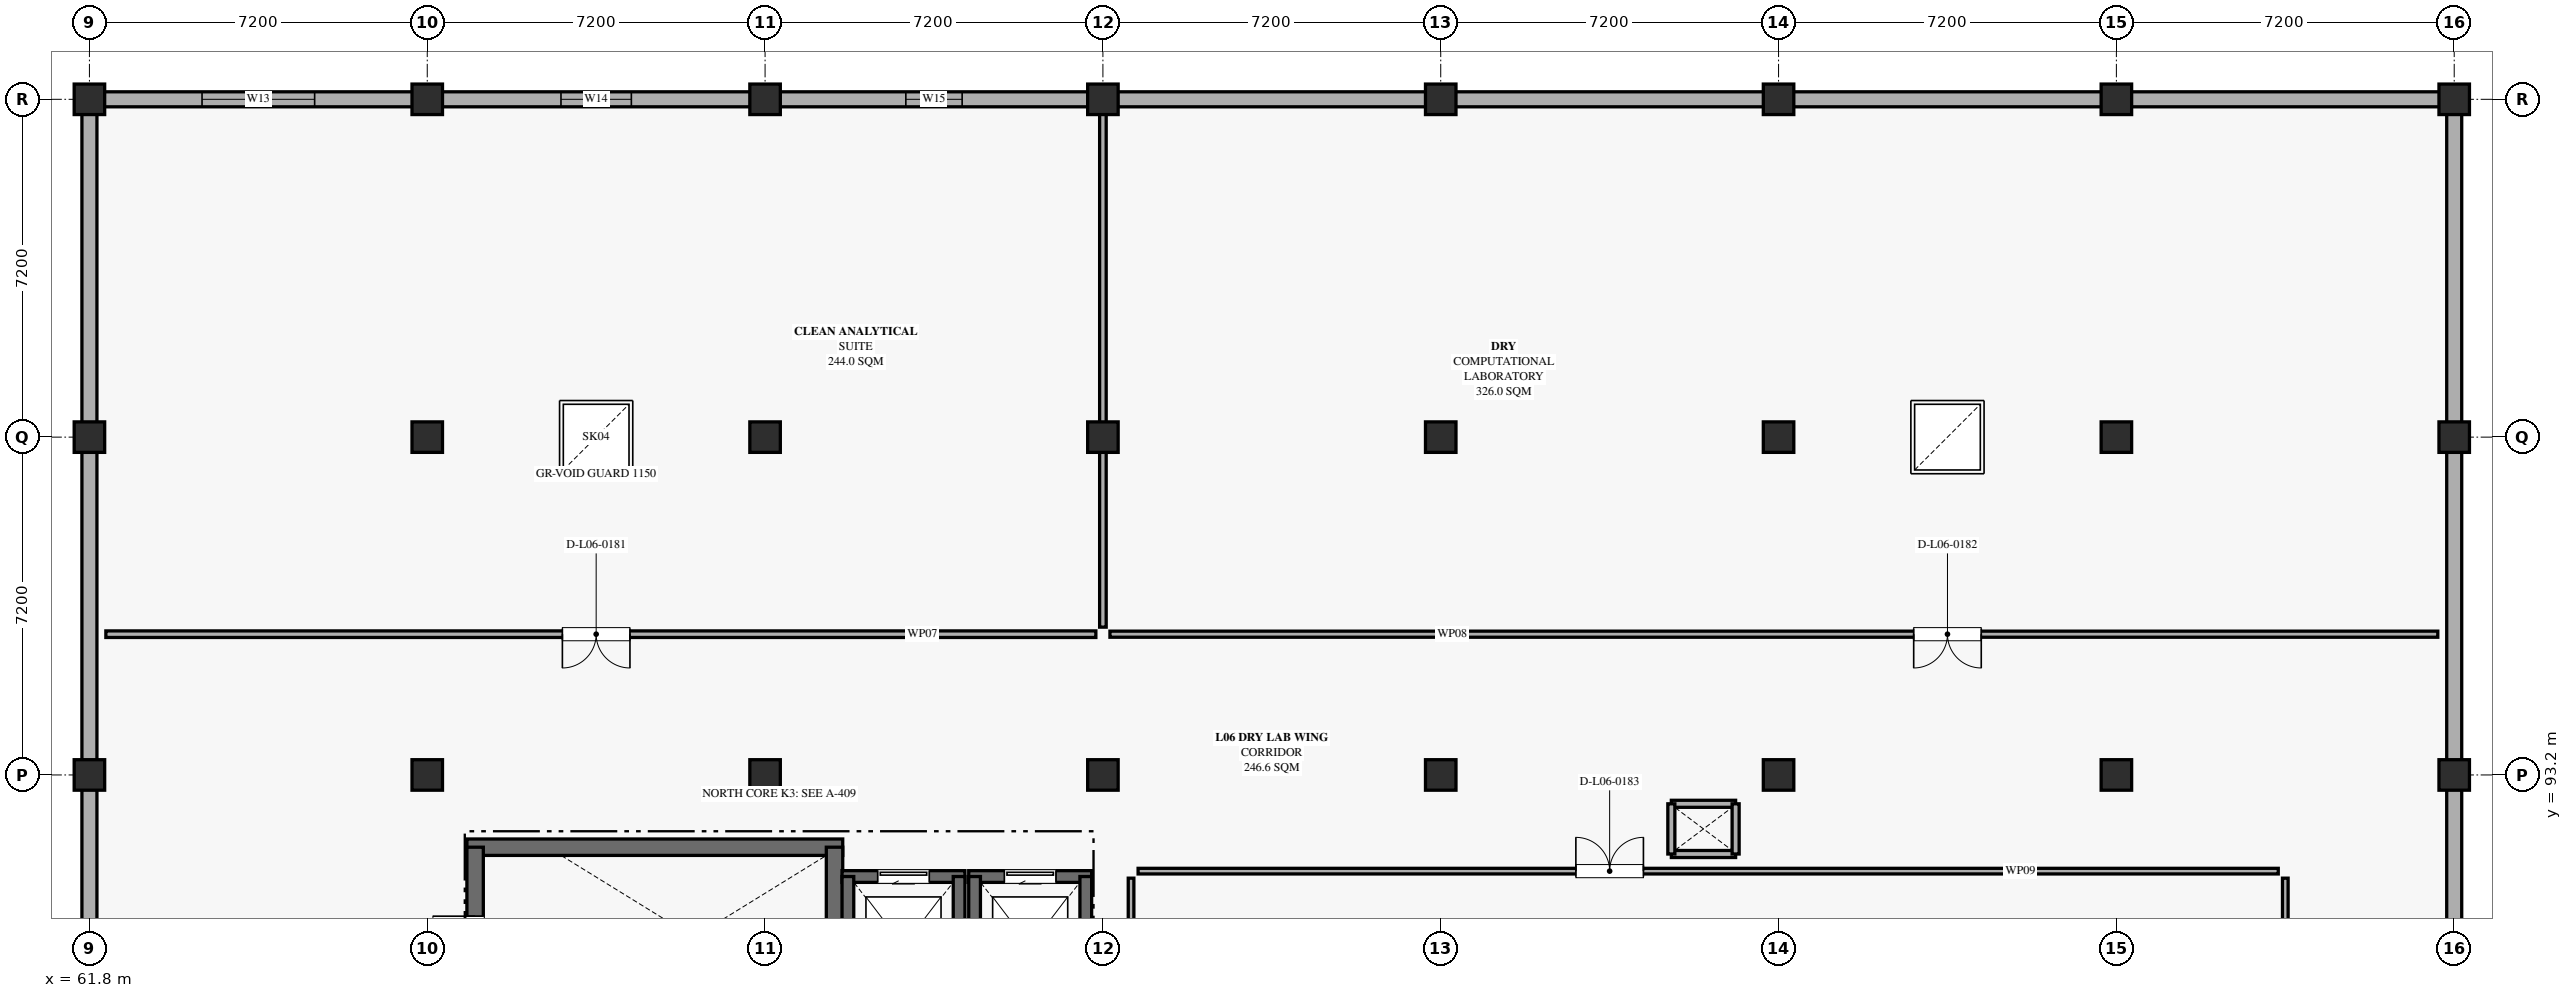
"""IFC4 building model, lengths in metres.
Left out: names, types, materials, properties, quantities, classifications, styles, units other than length and angle.
Written with IfcOpenShell. Run it as: python <this file> out.ifc"""

import sys

from ifc_helpers import new_model, si_unit, direction, frame, frame_2d, origin, origin_2d, place, context, subcontext, project, spatial, rectangle, extrude, element, fill, save


model = new_model("IFC4")
c1 = context("Model", 3, precision=1e-05, world=origin(), true_north=direction((0.0, 1.0)))
c2 = subcontext(c1, "Body", "Model", "MODEL_VIEW")
j1 = project(units=[si_unit("LENGTHUNIT", "METRE"), si_unit("PLANEANGLEUNIT", "RADIAN")], contexts=[c1])
p1 = place(None, origin())
s1 = spatial("IfcSite", under=j1, at=p1, CompositionType="ELEMENT")
p2 = place(p1, origin())
s2 = spatial("IfcBuilding", under=s1, at=p2, CompositionType="ELEMENT")
p3 = place(p2, frame((0.0, 0.0, 28.8)))
s3 = spatial("IfcBuildingStorey", under=s2, at=p3, CompositionType="ELEMENT", Elevation=28.8)
for number, where, z_axis, x_axis in (
    (1, (61.8, 93.2, 0.0), (0.0, 0.0, 1.0), (1.0, 0.0, 0.0)),
    (2, (69.0, 93.2, 0.0), (0.0, 0.0, 1.0), (1.0, 0.0, 0.0)),
    (3, (76.2, 93.2, 0.0), (0.0, 0.0, 1.0), (1.0, 0.0, 0.0)),
    (4, (83.4, 93.2, 0.0), (0.0, 0.0, 1.0), (1.0, 0.0, 0.0)),
    (5, (90.6, 93.2, 0.0), (0.0, 0.0, 1.0), (1.0, 0.0, 0.0)),
    (6, (97.8, 93.2, 0.0), (0.0, 0.0, 1.0), (1.0, 0.0, 0.0)),
    (7, (105.0, 93.2, 0.0), (0.0, 0.0, 1.0), (1.0, 0.0, 0.0)),
    (8, (112.2, 93.2, 0.0), (0.0, 0.0, 1.0), (1.0, 0.0, 0.0)),
    (9, (61.8, 100.4, 0.0), (0.0, 0.0, 1.0), (1.0, 0.0, 0.0)),
    (10, (69.0, 100.4, 0.0), (0.0, 0.0, 1.0), (1.0, 0.0, 0.0)),
    (11, (76.2, 100.4, 0.0), (0.0, 0.0, 1.0), (1.0, 0.0, 0.0)),
    (12, (83.4, 100.4, 0.0), (0.0, 0.0, 1.0), (1.0, 0.0, 0.0)),
    (13, (90.6, 100.4, 0.0), (0.0, 0.0, 1.0), (1.0, 0.0, 0.0)),
    (14, (97.8, 100.4, 0.0), (0.0, 0.0, 1.0), (1.0, 0.0, 0.0)),
    (15, (105.0, 100.4, 0.0), (0.0, 0.0, 1.0), (1.0, 0.0, 0.0)),
    (16, (112.2, 100.4, 0.0), (0.0, 0.0, 1.0), (1.0, 0.0, 0.0)),
    (17, (61.8, 107.6, 0.0), (0.0, 0.0, 1.0), (1.0, 0.0, 0.0)),
    (18, (69.0, 107.6, 0.0), (0.0, 0.0, 1.0), (1.0, 0.0, 0.0)),
    (19, (76.2, 107.6, 0.0), (0.0, 0.0, 1.0), (1.0, 0.0, 0.0)),
    (20, (83.4, 107.6, 0.0), (0.0, 0.0, 1.0), (1.0, 0.0, 0.0)),
    (21, (90.6, 107.6, 0.0), (0.0, 0.0, 1.0), (1.0, 0.0, 0.0)),
    (22, (97.8, 107.6, 0.0), (0.0, 0.0, 1.0), (1.0, 0.0, 0.0)),
    (23, (105.0, 107.6, 0.0), (0.0, 0.0, 1.0), (1.0, 0.0, 0.0)),
    (24, (112.2, 107.6, 0.0), (0.0, 0.0, 1.0), (1.0, 0.0, 0.0)),
):
    element("IfcColumn", number, at=place(p3, frame(where, z_axis=z_axis, x_axis=x_axis)), inside=s3, PredefinedType="COLUMN", context=c2, shape_type="SweptSolid", body=[
        extrude(rectangle(XDim=0.65, YDim=0.65, at=origin_2d()), origin(), (0.0, 0.0, 1.0), 4.5),
    ])
for number, where, z_axis, x_axis in (
    (25, (61.8, 86.31, 0.0), (0.0, 0.0, 1.0), (0.0, 1.0, 0.0)),
    (26, (112.2, 92.89, 0.0), (0.0, 0.0, 1.0), (0.0, -1.0, 0.0)),
):
    element("IfcWall", number, at=place(p3, frame(where, z_axis=z_axis, x_axis=x_axis)), inside=s3, PredefinedType="SOLIDWALL", context=c2, shape_type="SweptSolid", body=[
        extrude(rectangle(XDim=6.58, YDim=0.32, at=frame_2d((3.29, 0.0))), origin(), (0.0, 0.0, 1.0), 3.0),
    ])
for number, where, z_axis, x_axis in (
    (27, (61.8, 93.51, 0.0), (0.0, 0.0, 1.0), (0.0, 1.0, 0.0)),
    (28, (112.2, 100.09, 0.0), (0.0, 0.0, 1.0), (0.0, -1.0, 0.0)),
    (29, (61.8, 100.71, 0.0), (0.0, 0.0, 1.0), (0.0, 1.0, 0.0)),
    (30, (112.2, 107.29, 0.0), (0.0, 0.0, 1.0), (0.0, -1.0, 0.0)),
):
    element("IfcWall", number, at=place(p3, frame(where, z_axis=z_axis, x_axis=x_axis)), inside=s3, PredefinedType="SOLIDWALL", context=c2, shape_type="SweptSolid", body=[
        extrude(rectangle(XDim=6.58, YDim=0.32, at=frame_2d((3.29, 0.0))), origin(), (0.0, 0.0, 1.0), 3.0),
    ])
p4 = place(p3, frame((62.11, 107.6, 0.0), z_axis=(0.0, 0.0, 1.0), x_axis=(1.0, 0.0, 0.0)))
e31 = element("IfcWall", 31, at=p4, inside=s3, PredefinedType="SOLIDWALL", context=c2, shape_type="SweptSolid", body=[
    extrude(rectangle(XDim=6.58, YDim=0.32, at=frame_2d((3.29, 0.0))), origin(), (0.0, 0.0, 1.0), 3.0),
])
p5 = place(p4, frame((2.09, 0.0, 0.85)))
e32 = element("IfcOpeningElement", 32, at=p5, cuts=e31, PredefinedType="OPENING", context=c2, shape_type="SweptSolid", body=[
    extrude(rectangle(XDim=2.4, YDim=1.8, at=frame_2d((1.2, 0.9))), frame((0.0, 0.17, 0.0), z_axis=(0.0, -1.0, 0.0), x_axis=(1.0, 0.0, 0.0)), (0.0, 0.0, 1.0), 0.34),
])
p6 = place(p3, frame((69.31, 107.6, 0.0), z_axis=(0.0, 0.0, 1.0), x_axis=(1.0, 0.0, 0.0)))
e33 = element("IfcWall", 33, at=p6, inside=s3, PredefinedType="SOLIDWALL", context=c2, shape_type="SweptSolid", body=[
    extrude(rectangle(XDim=6.58, YDim=0.32, at=frame_2d((3.29, 0.0))), origin(), (0.0, 0.0, 1.0), 3.0),
])
p7 = place(p6, frame((2.54, 0.0, 0.85)))
e34 = element("IfcOpeningElement", 34, at=p7, cuts=e33, PredefinedType="OPENING", context=c2, shape_type="SweptSolid", body=[
    extrude(rectangle(XDim=1.5, YDim=1.8, at=frame_2d((0.75, 0.9))), frame((0.0, 0.17, 0.0), z_axis=(0.0, -1.0, 0.0), x_axis=(1.0, 0.0, 0.0)), (0.0, 0.0, 1.0), 0.34),
])
p8 = place(p3, frame((76.51, 107.6, 0.0), z_axis=(0.0, 0.0, 1.0), x_axis=(1.0, 0.0, 0.0)))
e35 = element("IfcWall", 35, at=p8, inside=s3, PredefinedType="SOLIDWALL", context=c2, shape_type="SweptSolid", body=[
    extrude(rectangle(XDim=6.58, YDim=0.32, at=frame_2d((3.29, 0.0))), origin(), (0.0, 0.0, 1.0), 3.0),
])
p9 = place(p8, frame((2.69, 0.0, 0.85)))
e36 = element("IfcOpeningElement", 36, at=p9, cuts=e35, PredefinedType="OPENING", context=c2, shape_type="SweptSolid", body=[
    extrude(rectangle(XDim=1.2, YDim=1.8, at=frame_2d((0.6, 0.9))), frame((0.0, 0.17, 0.0), z_axis=(0.0, -1.0, 0.0), x_axis=(1.0, 0.0, 0.0)), (0.0, 0.0, 1.0), 0.34),
])
for number, where, z_axis, x_axis in (
    (37, (83.71, 107.6, 0.0), (0.0, 0.0, 1.0), (1.0, 0.0, 0.0)),
    (38, (90.91, 107.6, 0.0), (0.0, 0.0, 1.0), (1.0, 0.0, 0.0)),
):
    element("IfcWall", number, at=place(p3, frame(where, z_axis=z_axis, x_axis=x_axis)), inside=s3, PredefinedType="SOLIDWALL", context=c2, shape_type="SweptSolid", body=[
        extrude(rectangle(XDim=6.58, YDim=0.32, at=frame_2d((3.29, 0.0))), origin(), (0.0, 0.0, 1.0), 3.0),
    ])
for number, where, z_axis, x_axis in (
    (39, (98.11, 107.6, 0.0), (0.0, 0.0, 1.0), (1.0, 0.0, 0.0)),
    (40, (105.31, 107.6, 0.0), (0.0, 0.0, 1.0), (1.0, 0.0, 0.0)),
):
    element("IfcWall", number, at=place(p3, frame(where, z_axis=z_axis, x_axis=x_axis)), inside=s3, PredefinedType="SOLIDWALL", context=c2, shape_type="SweptSolid", body=[
        extrude(rectangle(XDim=6.58, YDim=0.32, at=frame_2d((3.29, 0.0))), origin(), (0.0, 0.0, 1.0), 3.0),
    ])
p10 = place(p3, frame((69.845, 91.66, 0.0), z_axis=(0.0, 0.0, 1.0), x_axis=(1.0, 0.0, 0.0)))
e41 = element("IfcWall", 41, at=p10, inside=s3, PredefinedType="SHEAR", context=c2, shape_type="SweptSolid", body=[
    extrude(rectangle(XDim=8.01, YDim=0.35, at=frame_2d((4.005, 0.0))), origin(), (0.0, 0.0, 1.0), 4.23),
])
p11 = place(p3, frame((70.02, 87.82, 0.0), z_axis=(0.0, 0.0, 1.0), x_axis=(0.0, 1.0, 0.0)))
e42 = element("IfcWall", 42, at=p11, inside=s3, PredefinedType="SHEAR", context=c2, shape_type="SweptSolid", body=[
    extrude(rectangle(XDim=3.84, YDim=0.35, at=frame_2d((1.92, 0.0))), origin(), (0.0, 0.0, 1.0), 4.23),
])
p12 = place(p11, frame((1.47, 0.0, 0.0)))
e43 = element("IfcOpeningElement", 43, at=p12, cuts=e42, PredefinedType="OPENING", context=c2, shape_type="SweptSolid", body=[
    extrude(rectangle(XDim=0.9, YDim=2.06, at=frame_2d((0.45, 1.03))), frame((0.0, 0.185, 0.0), z_axis=(0.0, -1.0, 0.0), x_axis=(1.0, 0.0, 0.0)), (0.0, 0.0, 1.0), 0.37),
])
p13 = place(p3, frame((77.68, 91.66, 0.0), z_axis=(0.0, 0.0, 1.0), x_axis=(0.0, -1.0, 0.0)))
e44 = element("IfcWall", 44, at=p13, inside=s3, PredefinedType="SHEAR", context=c2, shape_type="SweptSolid", body=[
    extrude(rectangle(XDim=3.84, YDim=0.35, at=frame_2d((1.92, 0.0))), origin(), (0.0, 0.0, 1.0), 4.23),
])
for number, where, z_axis, x_axis in (
    (45, (96.885, 91.515, 0.0), (0.0, 0.0, 1.0), (-1.0, 0.0, 0.0)),
    (46, (95.515, 92.585, 0.0), (0.0, 0.0, 1.0), (1.0, 0.0, 0.0)),
):
    element("IfcWall", number, at=place(p3, frame(where, z_axis=z_axis, x_axis=x_axis)), inside=s3, PredefinedType="PARTITIONING", context=c2, shape_type="SweptSolid", body=[
        extrude(rectangle(XDim=1.37, YDim=0.15, at=frame_2d((0.685, 0.0))), origin(), (0.0, 0.0, 1.0), 2.98),
    ])
for number, where, z_axis, x_axis in (
    (47, (95.515, 91.515, 0.0), (0.0, 0.0, 1.0), (0.0, 1.0, 0.0)),
    (48, (96.885, 92.585, 0.0), (0.0, 0.0, 1.0), (0.0, -1.0, 0.0)),
):
    element("IfcWall", number, at=place(p3, frame(where, z_axis=z_axis, x_axis=x_axis)), inside=s3, PredefinedType="PARTITIONING", context=c2, shape_type="SweptSolid", body=[
        extrude(rectangle(XDim=1.07, YDim=0.15, at=frame_2d((0.535, 0.0))), origin(), (0.0, 0.0, 1.0), 2.98),
    ])
p14 = place(p3, frame((77.84, 91.035, 0.0), z_axis=(0.0, 0.0, 1.0), x_axis=(1.0, 0.0, 0.0)))
e49 = element("IfcWall", 49, at=p14, inside=s3, PredefinedType="SHEAR", context=c2, shape_type="SweptSolid", body=[
    extrude(rectangle(XDim=2.62, YDim=0.25, at=frame_2d((1.31, 0.0))), origin(), (0.0, 0.0, 1.0), 4.23),
])
p15 = place(p14, frame((0.76, 0.0, 0.0)))
e50 = element("IfcOpeningElement", 50, at=p15, cuts=e49, PredefinedType="OPENING", context=c2, shape_type="SweptSolid", body=[
    extrude(rectangle(XDim=1.1, YDim=2.2, at=frame_2d((0.55, 1.1))), frame((0.0, 0.135, 0.0), z_axis=(0.0, -1.0, 0.0), x_axis=(1.0, 0.0, 0.0)), (0.0, 0.0, 1.0), 0.27),
])
for number, where, z_axis, x_axis in (
    (51, (77.965, 88.065, 0.0), (0.0, 0.0, 1.0), (0.0, 1.0, 0.0)),
    (52, (80.335, 91.035, 0.0), (0.0, 0.0, 1.0), (0.0, -1.0, 0.0)),
):
    element("IfcWall", number, at=place(p3, frame(where, z_axis=z_axis, x_axis=x_axis)), inside=s3, PredefinedType="SHEAR", context=c2, shape_type="SweptSolid", body=[
        extrude(rectangle(XDim=2.97, YDim=0.25, at=frame_2d((1.485, 0.0))), origin(), (0.0, 0.0, 1.0), 4.23),
    ])
p16 = place(p3, frame((80.54, 91.035, 0.0), z_axis=(0.0, 0.0, 1.0), x_axis=(1.0, 0.0, 0.0)))
e53 = element("IfcWall", 53, at=p16, inside=s3, PredefinedType="SHEAR", context=c2, shape_type="SweptSolid", body=[
    extrude(rectangle(XDim=2.62, YDim=0.25, at=frame_2d((1.31, 0.0))), origin(), (0.0, 0.0, 1.0), 4.23),
])
p17 = place(p16, frame((0.76, 0.0, 0.0)))
e54 = element("IfcOpeningElement", 54, at=p17, cuts=e53, PredefinedType="OPENING", context=c2, shape_type="SweptSolid", body=[
    extrude(rectangle(XDim=1.1, YDim=2.2, at=frame_2d((0.55, 1.1))), frame((0.0, 0.135, 0.0), z_axis=(0.0, -1.0, 0.0), x_axis=(1.0, 0.0, 0.0)), (0.0, 0.0, 1.0), 0.27),
])
for number, where, z_axis, x_axis in (
    (55, (80.665, 88.065, 0.0), (0.0, 0.0, 1.0), (0.0, 1.0, 0.0)),
    (56, (83.035, 91.035, 0.0), (0.0, 0.0, 1.0), (0.0, -1.0, 0.0)),
):
    element("IfcWall", number, at=place(p3, frame(where, z_axis=z_axis, x_axis=x_axis)), inside=s3, PredefinedType="SHEAR", context=c2, shape_type="SweptSolid", body=[
        extrude(rectangle(XDim=2.97, YDim=0.25, at=frame_2d((1.485, 0.0))), origin(), (0.0, 0.0, 1.0), 4.23),
    ])
p18 = place(p3, frame((83.25, 96.2, 0.0), z_axis=(0.0, 0.0, 1.0), x_axis=(-1.0, 0.0, 0.0)))
e57 = element("IfcWall", 57, at=p18, inside=s3, PredefinedType="PARTITIONING", context=c2, shape_type="SweptSolid", body=[
    extrude(rectangle(XDim=21.1, YDim=0.14, at=frame_2d((10.55, 0.0))), origin(), (0.0, 0.0, 1.0), 2.98),
])
p19 = place(p18, frame((9.93, 0.0, 0.0)))
e58 = element("IfcOpeningElement", 58, at=p19, cuts=e57, PredefinedType="OPENING", context=c2, shape_type="SweptSolid", body=[
    extrude(rectangle(XDim=1.44, YDim=2.05, at=frame_2d((0.72, 1.025))), frame((0.0, 0.08, 0.0), z_axis=(0.0, -1.0, 0.0), x_axis=(1.0, 0.0, 0.0)), (0.0, 0.0, 1.0), 0.16),
])
p20 = place(p3, frame((83.4, 107.45, 0.0), z_axis=(0.0, 0.0, 1.0), x_axis=(0.0, -1.0, 0.0)))
e59 = element("IfcWall", 59, at=p20, inside=s3, PredefinedType="PARTITIONING", context=c2, shape_type="SweptSolid", body=[
    extrude(rectangle(XDim=11.1, YDim=0.14, at=frame_2d((5.55, 0.0))), origin(), (0.0, 0.0, 1.0), 2.98),
])
p21 = place(p3, frame((111.85, 96.2, 0.0), z_axis=(0.0, 0.0, 1.0), x_axis=(-1.0, 0.0, 0.0)))
e60 = element("IfcWall", 60, at=p21, inside=s3, PredefinedType="PARTITIONING", context=c2, shape_type="SweptSolid", body=[
    extrude(rectangle(XDim=28.3, YDim=0.13, at=frame_2d((14.15, 0.0))), origin(), (0.0, 0.0, 1.0), 2.98),
])
p22 = place(p21, frame((9.73, 0.0, 0.0)))
e61 = element("IfcOpeningElement", 61, at=p22, cuts=e60, PredefinedType="OPENING", context=c2, shape_type="SweptSolid", body=[
    extrude(rectangle(XDim=1.44, YDim=2.1, at=frame_2d((0.72, 1.05))), frame((0.0, 0.075, 0.0), z_axis=(0.0, -1.0, 0.0), x_axis=(1.0, 0.0, 0.0)), (0.0, 0.0, 1.0), 0.15),
])
p23 = place(p3, frame((84.15, 91.15, 0.0), z_axis=(0.0, 0.0, 1.0), x_axis=(1.0, 0.0, 0.0)))
e62 = element("IfcWall", 62, at=p23, inside=s3, PredefinedType="PARTITIONING", context=c2, shape_type="SweptSolid", body=[
    extrude(rectangle(XDim=24.3, YDim=0.12, at=frame_2d((12.15, 0.0))), origin(), (0.0, 0.0, 1.0), 2.98),
])
p24 = place(p23, frame((9.33, 0.0, 0.0)))
e63 = element("IfcOpeningElement", 63, at=p24, cuts=e62, PredefinedType="OPENING", context=c2, shape_type="SweptSolid", body=[
    extrude(rectangle(XDim=1.44, YDim=2.16, at=frame_2d((0.72, 1.08))), frame((0.0, 0.07, 0.0), z_axis=(0.0, -1.0, 0.0), x_axis=(1.0, 0.0, 0.0)), (0.0, 0.0, 1.0), 0.14),
])
for number, where, z_axis, x_axis in (
    (64, (84.0, 86.35, 0.0), (0.0, 0.0, 1.0), (0.0, 1.0, 0.0)),
    (65, (108.6, 91.0, 0.0), (0.0, 0.0, 1.0), (0.0, -1.0, 0.0)),
):
    element("IfcWall", number, at=place(p3, frame(where, z_axis=z_axis, x_axis=x_axis)), inside=s3, PredefinedType="PARTITIONING", context=c2, shape_type="SweptSolid", body=[
        extrude(rectangle(XDim=4.65, YDim=0.12, at=frame_2d((2.325, 0.0))), origin(), (0.0, 0.0, 1.0), 2.98),
    ])
p25 = place(p5, origin())
e66 = element("IfcWindow", 66, at=p25, inside=s3, PartitioningType="DOUBLE_PANEL_VERTICAL", PredefinedType="WINDOW", context=c2, shape_type="SweptSolid", body=[
    extrude(rectangle(XDim=2.4, YDim=1.8, at=frame_2d((1.2, 0.9))), frame((0.0, 0.03, 0.0), z_axis=(0.0, -1.0, 0.0), x_axis=(1.0, 0.0, 0.0)), (0.0, 0.0, 1.0), 0.06),
])
fill(e32, e66)
p26 = place(p7, origin())
e67 = element("IfcWindow", 67, at=p26, inside=s3, PartitioningType="SINGLE_PANEL", PredefinedType="WINDOW", context=c2, shape_type="SweptSolid", body=[
    extrude(rectangle(XDim=1.5, YDim=1.8, at=frame_2d((0.75, 0.9))), frame((0.0, 0.03, 0.0), z_axis=(0.0, -1.0, 0.0), x_axis=(1.0, 0.0, 0.0)), (0.0, 0.0, 1.0), 0.06),
])
fill(e34, e67)
p27 = place(p9, origin())
e68 = element("IfcWindow", 68, at=p27, inside=s3, PartitioningType="SINGLE_PANEL", PredefinedType="WINDOW", context=c2, shape_type="SweptSolid", body=[
    extrude(rectangle(XDim=1.2, YDim=1.8, at=frame_2d((0.6, 0.9))), frame((0.0, 0.03, 0.0), z_axis=(0.0, -1.0, 0.0), x_axis=(1.0, 0.0, 0.0)), (0.0, 0.0, 1.0), 0.06),
])
fill(e36, e68)
p28 = place(p3, frame((0.0, 0.0, -0.25)))
p29 = place(p28, frame((72.6, 100.4, 0.0)))
p30 = place(p29, frame((0.0, 0.0, 0.2)))
e69 = element("IfcWindow", 69, at=p30, inside=s3, PartitioningType="SINGLE_PANEL", PredefinedType="SKYLIGHT", context=c2, shape_type="SweptSolid", body=[
    extrude(rectangle(XDim=1.4, YDim=1.4, at=origin_2d()), origin(), (0.0, 0.0, 1.0), 0.05),
])
p31 = place(p28, frame((101.4, 100.4, 0.0)))
p32 = place(p31, frame((0.0, 0.0, 0.2)))
e70 = element("IfcWindow", 70, at=p32, inside=s3, PartitioningType="SINGLE_PANEL", PredefinedType="SKYLIGHT", context=c2, shape_type="SweptSolid", body=[
    extrude(rectangle(XDim=1.4, YDim=1.4, at=origin_2d()), origin(), (0.0, 0.0, 1.0), 0.05),
])
p33 = place(p12, origin())
e71 = element("IfcDoor", 71, at=p33, inside=s3, OperationType="SINGLE_SWING_RIGHT", PredefinedType="DOOR", context=c2, shape_type="SweptSolid", body=[
    extrude(rectangle(XDim=0.9, YDim=2.06, at=frame_2d((0.45, 1.03))), frame((0.0, 0.025, 0.0), z_axis=(0.0, -1.0, 0.0), x_axis=(1.0, 0.0, 0.0)), (0.0, 0.0, 1.0), 0.05),
])
fill(e43, e71)
p34 = place(p15, origin())
e72 = element("IfcDoor", 72, at=p34, inside=s3, OperationType="SLIDING_TO_LEFT", PredefinedType="DOOR", context=c2, shape_type="SweptSolid", body=[
    extrude(rectangle(XDim=1.1, YDim=2.2, at=frame_2d((0.55, 1.1))), frame((0.0, 0.025, 0.0), z_axis=(0.0, -1.0, 0.0), x_axis=(1.0, 0.0, 0.0)), (0.0, 0.0, 1.0), 0.05),
])
fill(e50, e72)
p35 = place(p17, origin())
e73 = element("IfcDoor", 73, at=p35, inside=s3, OperationType="SLIDING_TO_LEFT", PredefinedType="DOOR", context=c2, shape_type="SweptSolid", body=[
    extrude(rectangle(XDim=1.1, YDim=2.2, at=frame_2d((0.55, 1.1))), frame((0.0, 0.025, 0.0), z_axis=(0.0, -1.0, 0.0), x_axis=(1.0, 0.0, 0.0)), (0.0, 0.0, 1.0), 0.05),
])
fill(e54, e73)
p36 = place(p19, origin())
e74 = element("IfcDoor", 74, at=p36, inside=s3, OperationType="DOUBLE_DOOR_SINGLE_SWING", PredefinedType="DOOR", context=c2, shape_type="SweptSolid", body=[
    extrude(rectangle(XDim=1.44, YDim=2.05, at=frame_2d((0.72, 1.025))), frame((0.0, 0.025, 0.0), z_axis=(0.0, -1.0, 0.0), x_axis=(1.0, 0.0, 0.0)), (0.0, 0.0, 1.0), 0.05),
])
fill(e58, e74)
p37 = place(p22, origin())
e75 = element("IfcDoor", 75, at=p37, inside=s3, OperationType="DOUBLE_DOOR_SINGLE_SWING", PredefinedType="DOOR", context=c2, shape_type="SweptSolid", body=[
    extrude(rectangle(XDim=1.44, YDim=2.1, at=frame_2d((0.72, 1.05))), frame((0.0, 0.025, 0.0), z_axis=(0.0, -1.0, 0.0), x_axis=(1.0, 0.0, 0.0)), (0.0, 0.0, 1.0), 0.05),
])
fill(e61, e75)
p38 = place(p24, origin())
e76 = element("IfcDoor", 76, at=p38, inside=s3, OperationType="DOUBLE_DOOR_SINGLE_SWING", PredefinedType="DOOR", context=c2, shape_type="SweptSolid", body=[
    extrude(rectangle(XDim=1.44, YDim=2.16, at=frame_2d((0.72, 1.08))), frame((0.0, 0.025, 0.0), z_axis=(0.0, -1.0, 0.0), x_axis=(1.0, 0.0, 0.0)), (0.0, 0.0, 1.0), 0.05),
])
fill(e63, e76)
save(model, sys.argv[1])
